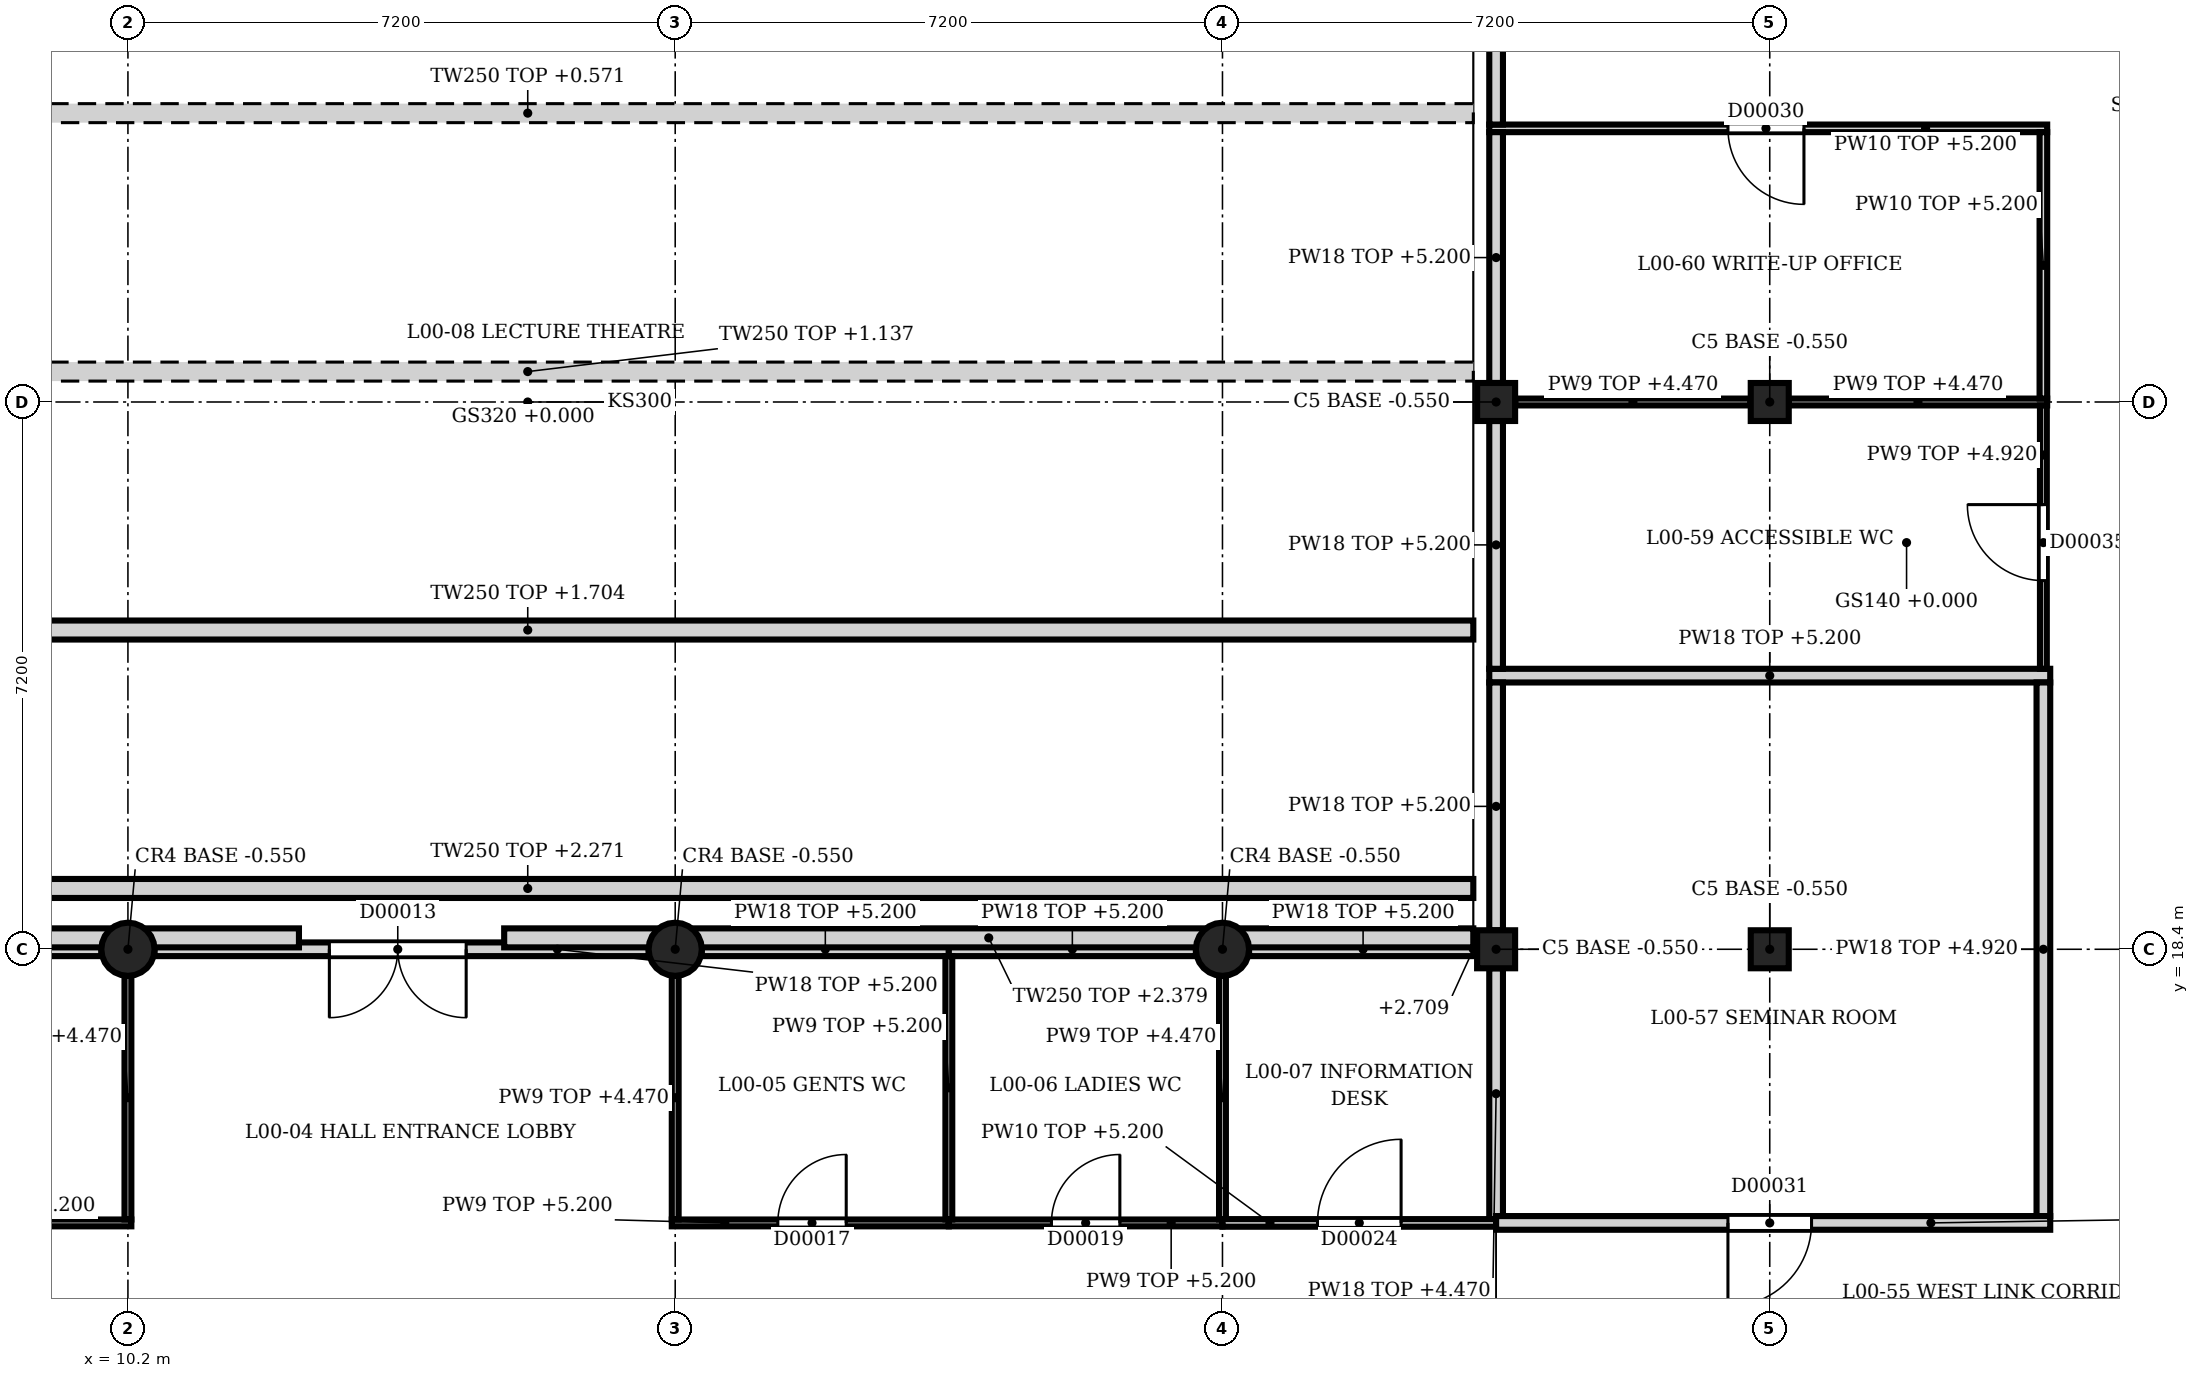
"""IFC4 building model, lengths in metres.
Left out: names, types, materials, properties, quantities, classifications, styles, units other than length and angle.
Written with IfcOpenShell. Run it as: python <this file> out.ifc"""

import sys

from ifc_helpers import new_model, si_unit, direction, frame, frame_2d, origin, origin_2d, place, context, subcontext, project, spatial, rectangle, circle, extrude, element, fill, save


model = new_model("IFC4")
c1 = context("Model", 3, precision=1e-05, world=origin(), true_north=direction((0.0, 1.0)))
c2 = subcontext(c1, "Body", "Model", "MODEL_VIEW")
j1 = project(units=[si_unit("LENGTHUNIT", "METRE"), si_unit("PLANEANGLEUNIT", "RADIAN")], contexts=[c1])
p1 = place(None, origin())
s1 = spatial("IfcSite", under=j1, at=p1, CompositionType="ELEMENT")
p2 = place(p1, origin())
s2 = spatial("IfcBuilding", under=s1, at=p2, CompositionType="ELEMENT")
p3 = place(p2, origin())
s3 = spatial("IfcBuildingStorey", under=s2, at=p3, CompositionType="ELEMENT", Elevation=0.0)
for number, where, z_axis, x_axis in (
    (1, (28.2, 18.4, -0.55), (0.0, 0.0, 1.0), (1.0, 0.0, 0.0)),
    (2, (28.2, 25.6, -0.55), (0.0, 0.0, 1.0), (1.0, 0.0, 0.0)),
    (3, (31.8, 18.4, -0.55), (0.0, 0.0, 1.0), (1.0, 0.0, 0.0)),
    (4, (31.8, 25.6, -0.55), (0.0, 0.0, 1.0), (1.0, 0.0, 0.0)),
):
    element("IfcColumn", number, at=place(p3, frame(where, z_axis=z_axis, x_axis=x_axis)), inside=s3, PredefinedType="COLUMN", context=c2, shape_type="SweptSolid", body=[
        extrude(rectangle(XDim=0.5, YDim=0.5, at=origin_2d()), origin(), (0.0, 0.0, 1.0), 5.95),
    ])
for number, where, z_axis, x_axis in (
    (5, (10.2, 18.4, -0.55), (0.0, 0.0, 1.0), (1.0, 0.0, 0.0)),
    (6, (17.4, 18.4, -0.55), (0.0, 0.0, 1.0), (1.0, 0.0, 0.0)),
    (7, (24.6, 18.4, -0.55), (0.0, 0.0, 1.0), (1.0, 0.0, 0.0)),
):
    element("IfcColumn", number, at=place(p3, frame(where, z_axis=z_axis, x_axis=x_axis)), inside=s3, PredefinedType="COLUMN", context=c2, shape_type="SweptSolid", body=[
        extrude(circle(Radius=0.35, at=origin_2d()), origin(), (0.0, 0.0, 1.0), 5.95),
    ])
p4 = place(p3, frame((3.02, 29.4, 0.0), z_axis=(0.0, 0.0, 1.0), x_axis=(1.0, 0.0, 0.0)))
e8 = element("IfcWall", 8, at=p4, inside=s3, PredefinedType="SOLIDWALL", context=c2, shape_type="SweptSolid", body=[
    extrude(rectangle(XDim=24.88, YDim=0.25, at=frame_2d((12.44, 0.0))), origin(), (0.0, 0.0, 1.0), 0.571),
])
p5 = place(p3, frame((3.02, 26.0, 0.0), z_axis=(0.0, 0.0, 1.0), x_axis=(1.0, 0.0, 0.0)))
e9 = element("IfcWall", 9, at=p5, inside=s3, PredefinedType="SOLIDWALL", context=c2, shape_type="SweptSolid", body=[
    extrude(rectangle(XDim=24.88, YDim=0.25, at=frame_2d((12.44, 0.0))), origin(), (0.0, 0.0, 1.0), 1.137),
])
p6 = place(p3, frame((3.02, 22.6, 0.0), z_axis=(0.0, 0.0, 1.0), x_axis=(1.0, 0.0, 0.0)))
e10 = element("IfcWall", 10, at=p6, inside=s3, PredefinedType="SOLIDWALL", context=c2, shape_type="SweptSolid", body=[
    extrude(rectangle(XDim=24.88, YDim=0.25, at=frame_2d((12.44, 0.0))), origin(), (0.0, 0.0, 1.0), 1.704),
])
p7 = place(p3, frame((3.02, 19.2, 0.0), z_axis=(0.0, 0.0, 1.0), x_axis=(1.0, 0.0, 0.0)))
e11 = element("IfcWall", 11, at=p7, inside=s3, PredefinedType="SOLIDWALL", context=c2, shape_type="SweptSolid", body=[
    extrude(rectangle(XDim=24.88, YDim=0.25, at=frame_2d((12.44, 0.0))), origin(), (0.0, 0.0, 1.0), 2.271),
])
p8 = place(p3, frame((3.02, 18.55, 0.0), z_axis=(0.0, 0.0, 1.0), x_axis=(1.0, 0.0, 0.0)))
e12 = element("IfcWall", 12, at=p8, inside=s3, PredefinedType="SOLIDWALL", context=c2, shape_type="SweptSolid", body=[
    extrude(rectangle(XDim=9.43, YDim=0.25, at=frame_2d((4.715, 0.0))), origin(), (0.0, 0.0, 1.0), 2.379),
])
p9 = place(p3, frame((15.15, 18.55, 0.0), z_axis=(0.0, 0.0, 1.0), x_axis=(1.0, 0.0, 0.0)))
e13 = element("IfcWall", 13, at=p9, inside=s3, PredefinedType="SOLIDWALL", context=c2, shape_type="SweptSolid", body=[
    extrude(rectangle(XDim=12.75, YDim=0.25, at=frame_2d((6.375, 0.0))), origin(), (0.0, 0.0, 1.0), 2.379),
])
p10 = place(p3, frame((3.1, 14.8, 0.0), z_axis=(0.0, 0.0, 1.0), x_axis=(1.0, 0.0, 0.0)))
e14 = element("IfcWall", 14, at=p10, inside=s3, PredefinedType="PARTITIONING", context=c2, shape_type="SweptSolid", body=[
    extrude(rectangle(XDim=7.145, YDim=0.09, at=frame_2d((3.573, 0.0))), origin(), (0.0, 0.0, 1.0), 5.2),
])
p11 = place(p10, frame((2.95, 0.0, 0.0)))
e15 = element("IfcOpeningElement", 15, at=p11, cuts=e14, PredefinedType="OPENING", context=c2, shape_type="SweptSolid", body=[
    extrude(rectangle(XDim=1.0, YDim=2.1, at=frame_2d((0.5, 1.05))), frame((0.0, 0.055, 0.0), z_axis=(0.0, -1.0, 0.0), x_axis=(1.0, 0.0, 0.0)), (0.0, 0.0, 1.0), 0.11),
])
p12 = place(p3, frame((17.355, 14.8, 0.0), z_axis=(0.0, 0.0, 1.0), x_axis=(1.0, 0.0, 0.0)))
e16 = element("IfcWall", 16, at=p12, inside=s3, PredefinedType="PARTITIONING", context=c2, shape_type="SweptSolid", body=[
    extrude(rectangle(XDim=3.645, YDim=0.09, at=frame_2d((1.823, 0.0))), origin(), (0.0, 0.0, 1.0), 5.2),
])
p13 = place(p12, frame((1.395, 0.0, 0.0)))
e17 = element("IfcOpeningElement", 17, at=p13, cuts=e16, PredefinedType="OPENING", context=c2, shape_type="SweptSolid", body=[
    extrude(rectangle(XDim=0.9, YDim=2.1, at=frame_2d((0.45, 1.05))), frame((0.0, 0.055, 0.0), z_axis=(0.0, -1.0, 0.0), x_axis=(1.0, 0.0, 0.0)), (0.0, 0.0, 1.0), 0.11),
])
p14 = place(p3, frame((21.0, 14.8, 0.0), z_axis=(0.0, 0.0, 1.0), x_axis=(1.0, 0.0, 0.0)))
e18 = element("IfcWall", 18, at=p14, inside=s3, PredefinedType="PARTITIONING", context=c2, shape_type="SweptSolid", body=[
    extrude(rectangle(XDim=3.6, YDim=0.09, at=frame_2d((1.8, 0.0))), origin(), (0.0, 0.0, 1.0), 5.2),
])
p15 = place(p14, frame((1.35, 0.0, 0.0)))
e19 = element("IfcOpeningElement", 19, at=p15, cuts=e18, PredefinedType="OPENING", context=c2, shape_type="SweptSolid", body=[
    extrude(rectangle(XDim=0.9, YDim=2.1, at=frame_2d((0.45, 1.05))), frame((0.0, 0.055, 0.0), z_axis=(0.0, -1.0, 0.0), x_axis=(1.0, 0.0, 0.0)), (0.0, 0.0, 1.0), 0.11),
])
p16 = place(p3, frame((24.6, 14.8, 0.0), z_axis=(0.0, 0.0, 1.0), x_axis=(1.0, 0.0, 0.0)))
e20 = element("IfcWall", 20, at=p16, inside=s3, PredefinedType="PARTITIONING", context=c2, shape_type="SweptSolid", body=[
    extrude(rectangle(XDim=3.6, YDim=0.1, at=frame_2d((1.8, 0.0))), origin(), (0.0, 0.0, 1.0), 5.2),
])
p17 = place(p16, frame((1.25, 0.0, 0.0)))
e21 = element("IfcOpeningElement", 21, at=p17, cuts=e20, PredefinedType="OPENING", context=c2, shape_type="SweptSolid", body=[
    extrude(rectangle(XDim=1.1, YDim=2.2, at=frame_2d((0.55, 1.1))), frame((0.0, 0.06, 0.0), z_axis=(0.0, -1.0, 0.0), x_axis=(1.0, 0.0, 0.0)), (0.0, 0.0, 1.0), 0.12),
])
p18 = place(p3, frame((28.2, 14.8, 0.0), z_axis=(0.0, 0.0, 1.0), x_axis=(1.0, 0.0, 0.0)))
e22 = element("IfcWall", 22, at=p18, inside=s3, PredefinedType="PARTITIONING", context=c2, shape_type="SweptSolid", body=[
    extrude(rectangle(XDim=7.29, YDim=0.18, at=frame_2d((3.645, 0.0))), origin(), (0.0, 0.0, 1.0), 5.2),
])
p19 = place(p18, frame((3.05, 0.0, 0.0)))
e23 = element("IfcOpeningElement", 23, at=p19, cuts=e22, PredefinedType="OPENING", context=c2, shape_type="SweptSolid", body=[
    extrude(rectangle(XDim=1.1, YDim=2.3, at=frame_2d((0.55, 1.15))), frame((0.0, 0.1, 0.0), z_axis=(0.0, -1.0, 0.0), x_axis=(1.0, 0.0, 0.0)), (0.0, 0.0, 1.0), 0.2),
])
p20 = place(p3, frame((3.35, 18.4, 0.0), z_axis=(0.0, 0.0, 1.0), x_axis=(1.0, 0.0, 0.0)))
e24 = element("IfcWall", 24, at=p20, inside=s3, PredefinedType="PARTITIONING", context=c2, shape_type="SweptSolid", body=[
    extrude(rectangle(XDim=6.5, YDim=0.18, at=frame_2d((3.25, 0.0))), origin(), (0.0, 0.0, 1.0), 5.2),
])
p21 = place(p3, frame((17.05, 18.4, 0.0), z_axis=(0.0, 0.0, 1.0), x_axis=(-1.0, 0.0, 0.0)))
e25 = element("IfcWall", 25, at=p21, inside=s3, PredefinedType="PARTITIONING", context=c2, shape_type="SweptSolid", body=[
    extrude(rectangle(XDim=6.5, YDim=0.18, at=frame_2d((3.25, 0.0))), origin(), (0.0, 0.0, 1.0), 5.2),
])
p22 = place(p21, frame((2.4, 0.0, 0.0)))
e26 = element("IfcOpeningElement", 26, at=p22, cuts=e25, PredefinedType="OPENING", context=c2, shape_type="SweptSolid", body=[
    extrude(rectangle(XDim=1.8, YDim=2.2, at=frame_2d((0.9, 1.1))), frame((0.0, 0.1, 0.0), z_axis=(0.0, -1.0, 0.0), x_axis=(1.0, 0.0, 0.0)), (0.0, 0.0, 1.0), 0.2),
])
for number, where, z_axis, x_axis in (
    (27, (17.75, 18.4, 0.0), (0.0, 0.0, 1.0), (1.0, 0.0, 0.0)),
    (28, (21.0, 18.4, 0.0), (0.0, 0.0, 1.0), (1.0, 0.0, 0.0)),
):
    element("IfcWall", number, at=place(p3, frame(where, z_axis=z_axis, x_axis=x_axis)), inside=s3, PredefinedType="PARTITIONING", context=c2, shape_type="SweptSolid", body=[
        extrude(rectangle(XDim=3.25, YDim=0.18, at=frame_2d((1.625, 0.0))), origin(), (0.0, 0.0, 1.0), 5.2),
    ])
p23 = place(p3, frame((24.95, 18.4, 0.0), z_axis=(0.0, 0.0, 1.0), x_axis=(1.0, 0.0, 0.0)))
e29 = element("IfcWall", 29, at=p23, inside=s3, PredefinedType="PARTITIONING", context=c2, shape_type="SweptSolid", body=[
    extrude(rectangle(XDim=3.0, YDim=0.18, at=frame_2d((1.5, 0.0))), origin(), (0.0, 0.0, 1.0), 5.2),
])
p24 = place(p3, frame((28.11, 22.0, 0.0), z_axis=(0.0, 0.0, 1.0), x_axis=(1.0, 0.0, 0.0)))
e30 = element("IfcWall", 30, at=p24, inside=s3, PredefinedType="PARTITIONING", context=c2, shape_type="SweptSolid", body=[
    extrude(rectangle(XDim=7.38, YDim=0.18, at=frame_2d((3.69, 0.0))), origin(), (0.0, 0.0, 1.0), 5.2),
])
p25 = place(p3, frame((28.45, 25.6, 0.0), z_axis=(0.0, 0.0, 1.0), x_axis=(1.0, 0.0, 0.0)))
e31 = element("IfcWall", 31, at=p25, inside=s3, PredefinedType="PARTITIONING", context=c2, shape_type="SweptSolid", body=[
    extrude(rectangle(XDim=3.1, YDim=0.09, at=frame_2d((1.55, 0.0))), origin(), (0.0, 0.0, 1.0), 4.47),
])
p26 = place(p3, frame((32.05, 25.6, 0.0), z_axis=(0.0, 0.0, 1.0), x_axis=(1.0, 0.0, 0.0)))
e32 = element("IfcWall", 32, at=p26, inside=s3, PredefinedType="PARTITIONING", context=c2, shape_type="SweptSolid", body=[
    extrude(rectangle(XDim=3.4, YDim=0.09, at=frame_2d((1.7, 0.0))), origin(), (0.0, 0.0, 1.0), 4.47),
])
p27 = place(p3, frame((35.45, 29.2, 0.0), z_axis=(0.0, 0.0, 1.0), x_axis=(-1.0, 0.0, 0.0)))
e33 = element("IfcWall", 33, at=p27, inside=s3, PredefinedType="PARTITIONING", context=c2, shape_type="SweptSolid", body=[
    extrude(rectangle(XDim=7.34, YDim=0.1, at=frame_2d((3.67, 0.0))), origin(), (0.0, 0.0, 1.0), 5.2),
])
p28 = place(p27, frame((3.2, 0.0, 0.0)))
e34 = element("IfcOpeningElement", 34, at=p28, cuts=e33, PredefinedType="OPENING", context=c2, shape_type="SweptSolid", body=[
    extrude(rectangle(XDim=1.0, YDim=2.1, at=frame_2d((0.5, 1.05))), frame((0.0, 0.06, 0.0), z_axis=(0.0, -1.0, 0.0), x_axis=(1.0, 0.0, 0.0)), (0.0, 0.0, 1.0), 0.12),
])
for number, where, z_axis, x_axis in (
    (35, (10.2, 14.845, 0.0), (0.0, 0.0, 1.0), (0.0, 1.0, 0.0)),
    (36, (17.4, 14.845, 0.0), (0.0, 0.0, 1.0), (0.0, 1.0, 0.0)),
):
    element("IfcWall", number, at=place(p3, frame(where, z_axis=z_axis, x_axis=x_axis)), inside=s3, PredefinedType="PARTITIONING", context=c2, shape_type="SweptSolid", body=[
        extrude(rectangle(XDim=3.205, YDim=0.09, at=frame_2d((1.603, 0.0))), origin(), (0.0, 0.0, 1.0), 4.47),
    ])
p29 = place(p3, frame((21.0, 14.845, 0.0), z_axis=(0.0, 0.0, 1.0), x_axis=(0.0, 1.0, 0.0)))
e37 = element("IfcWall", 37, at=p29, inside=s3, PredefinedType="PARTITIONING", context=c2, shape_type="SweptSolid", body=[
    extrude(rectangle(XDim=3.465, YDim=0.09, at=frame_2d((1.732, 0.0))), origin(), (0.0, 0.0, 1.0), 5.2),
])
p30 = place(p3, frame((24.6, 14.845, 0.0), z_axis=(0.0, 0.0, 1.0), x_axis=(0.0, 1.0, 0.0)))
e38 = element("IfcWall", 38, at=p30, inside=s3, PredefinedType="PARTITIONING", context=c2, shape_type="SweptSolid", body=[
    extrude(rectangle(XDim=3.205, YDim=0.09, at=frame_2d((1.603, 0.0))), origin(), (0.0, 0.0, 1.0), 4.47),
])
p31 = place(p3, frame((28.2, 14.85, 0.0), z_axis=(0.0, 0.0, 1.0), x_axis=(0.0, 1.0, 0.0)))
e39 = element("IfcWall", 39, at=p31, inside=s3, PredefinedType="PARTITIONING", context=c2, shape_type="SweptSolid", body=[
    extrude(rectangle(XDim=3.3, YDim=0.18, at=frame_2d((1.65, 0.0))), origin(), (0.0, 0.0, 1.0), 4.47),
])
for number, where, z_axis, x_axis in (
    (40, (28.2, 18.65, 0.0), (0.0, 0.0, 1.0), (0.0, 1.0, 0.0)),
    (41, (28.2, 22.09, 0.0), (0.0, 0.0, 1.0), (0.0, 1.0, 0.0)),
):
    element("IfcWall", number, at=place(p3, frame(where, z_axis=z_axis, x_axis=x_axis)), inside=s3, PredefinedType="PARTITIONING", context=c2, shape_type="SweptSolid", body=[
        extrude(rectangle(XDim=3.26, YDim=0.18, at=frame_2d((1.63, 0.0))), origin(), (0.0, 0.0, 1.0), 5.2),
    ])
p32 = place(p3, frame((28.2, 25.85, 0.0), z_axis=(0.0, 0.0, 1.0), x_axis=(0.0, 1.0, 0.0)))
e42 = element("IfcWall", 42, at=p32, inside=s3, PredefinedType="PARTITIONING", context=c2, shape_type="SweptSolid", body=[
    extrude(rectangle(XDim=3.3, YDim=0.18, at=frame_2d((1.65, 0.0))), origin(), (0.0, 0.0, 1.0), 5.2),
])
p33 = place(p3, frame((28.2, 29.25, 0.0), z_axis=(0.0, 0.0, 1.0), x_axis=(0.0, 1.0, 0.0)))
e43 = element("IfcWall", 43, at=p33, inside=s3, PredefinedType="PARTITIONING", context=c2, shape_type="SweptSolid", body=[
    extrude(rectangle(XDim=3.3, YDim=0.18, at=frame_2d((1.65, 0.0))), origin(), (0.0, 0.0, 1.0), 5.2),
])
p34 = place(p3, frame((35.4, 14.89, 0.0), z_axis=(0.0, 0.0, 1.0), x_axis=(0.0, 1.0, 0.0)))
e44 = element("IfcWall", 44, at=p34, inside=s3, PredefinedType="PARTITIONING", context=c2, shape_type="SweptSolid", body=[
    extrude(rectangle(XDim=7.02, YDim=0.18, at=frame_2d((3.51, 0.0))), origin(), (0.0, 0.0, 1.0), 4.92),
])
p35 = place(p3, frame((35.4, 22.09, 0.0), z_axis=(0.0, 0.0, 1.0), x_axis=(0.0, 1.0, 0.0)))
e45 = element("IfcWall", 45, at=p35, inside=s3, PredefinedType="PARTITIONING", context=c2, shape_type="SweptSolid", body=[
    extrude(rectangle(XDim=3.465, YDim=0.09, at=frame_2d((1.732, 0.0))), origin(), (0.0, 0.0, 1.0), 4.92),
])
p36 = place(p35, frame((1.16, 0.0, 0.0)))
e46 = element("IfcOpeningElement", 46, at=p36, cuts=e45, PredefinedType="OPENING", context=c2, shape_type="SweptSolid", body=[
    extrude(rectangle(XDim=1.0, YDim=2.2, at=frame_2d((0.5, 1.1))), frame((0.0, 0.055, 0.0), z_axis=(0.0, -1.0, 0.0), x_axis=(1.0, 0.0, 0.0)), (0.0, 0.0, 1.0), 0.11),
])
p37 = place(p3, frame((35.4, 25.645, 0.0), z_axis=(0.0, 0.0, 1.0), x_axis=(0.0, 1.0, 0.0)))
e47 = element("IfcWall", 47, at=p37, inside=s3, PredefinedType="PARTITIONING", context=c2, shape_type="SweptSolid", body=[
    extrude(rectangle(XDim=3.505, YDim=0.1, at=frame_2d((1.752, 0.0))), origin(), (0.0, 0.0, 1.0), 5.2),
])
p38 = place(p13, origin())
e48 = element("IfcDoor", 48, at=p38, inside=s3, OperationType="SINGLE_SWING_RIGHT", PredefinedType="DOOR", context=c2, shape_type="SweptSolid", body=[
    extrude(rectangle(XDim=0.9, YDim=2.1, at=frame_2d((0.45, 1.05))), frame((0.0, 0.025, 0.0), z_axis=(0.0, -1.0, 0.0), x_axis=(1.0, 0.0, 0.0)), (0.0, 0.0, 1.0), 0.05),
])
fill(e17, e48)
p39 = place(p15, origin())
e49 = element("IfcDoor", 49, at=p39, inside=s3, OperationType="SINGLE_SWING_LEFT", PredefinedType="DOOR", context=c2, shape_type="SweptSolid", body=[
    extrude(rectangle(XDim=0.9, YDim=2.1, at=frame_2d((0.45, 1.05))), frame((0.0, 0.025, 0.0), z_axis=(0.0, -1.0, 0.0), x_axis=(1.0, 0.0, 0.0)), (0.0, 0.0, 1.0), 0.05),
])
fill(e19, e49)
p40 = place(p17, origin())
e50 = element("IfcDoor", 50, at=p40, inside=s3, OperationType="SINGLE_SWING_LEFT", PredefinedType="DOOR", context=c2, shape_type="SweptSolid", body=[
    extrude(rectangle(XDim=1.1, YDim=2.2, at=frame_2d((0.55, 1.1))), frame((0.0, 0.025, 0.0), z_axis=(0.0, -1.0, 0.0), x_axis=(1.0, 0.0, 0.0)), (0.0, 0.0, 1.0), 0.05),
])
fill(e21, e50)
p41 = place(p19, origin())
e51 = element("IfcDoor", 51, at=p41, inside=s3, OperationType="SINGLE_SWING_LEFT", PredefinedType="DOOR", context=c2, shape_type="SweptSolid", body=[
    extrude(rectangle(XDim=1.1, YDim=2.3, at=frame_2d((0.55, 1.15))), frame((0.0, 0.025, 0.0), z_axis=(0.0, -1.0, 0.0), x_axis=(1.0, 0.0, 0.0)), (0.0, 0.0, 1.0), 0.05),
])
fill(e23, e51)
p42 = place(p22, origin())
e52 = element("IfcDoor", 52, at=p42, inside=s3, OperationType="SINGLE_SWING_LEFT", PredefinedType="DOOR", context=c2, shape_type="SweptSolid", body=[
    extrude(rectangle(XDim=1.8, YDim=2.2, at=frame_2d((0.9, 1.1))), frame((0.0, 0.025, 0.0), z_axis=(0.0, -1.0, 0.0), x_axis=(1.0, 0.0, 0.0)), (0.0, 0.0, 1.0), 0.05),
])
fill(e26, e52)
p43 = place(p28, origin())
e53 = element("IfcDoor", 53, at=p43, inside=s3, OperationType="SINGLE_SWING_RIGHT", PredefinedType="DOOR", context=c2, shape_type="SweptSolid", body=[
    extrude(rectangle(XDim=1.0, YDim=2.1, at=frame_2d((0.5, 1.05))), frame((0.0, 0.025, 0.0), z_axis=(0.0, -1.0, 0.0), x_axis=(1.0, 0.0, 0.0)), (0.0, 0.0, 1.0), 0.05),
])
fill(e34, e53)
p44 = place(p36, origin())
e54 = element("IfcDoor", 54, at=p44, inside=s3, OperationType="SINGLE_SWING_LEFT", PredefinedType="DOOR", context=c2, shape_type="SweptSolid", body=[
    extrude(rectangle(XDim=1.0, YDim=2.2, at=frame_2d((0.5, 1.1))), frame((0.0, 0.025, 0.0), z_axis=(0.0, -1.0, 0.0), x_axis=(1.0, 0.0, 0.0)), (0.0, 0.0, 1.0), 0.05),
])
fill(e46, e54)
save(model, sys.argv[1])
